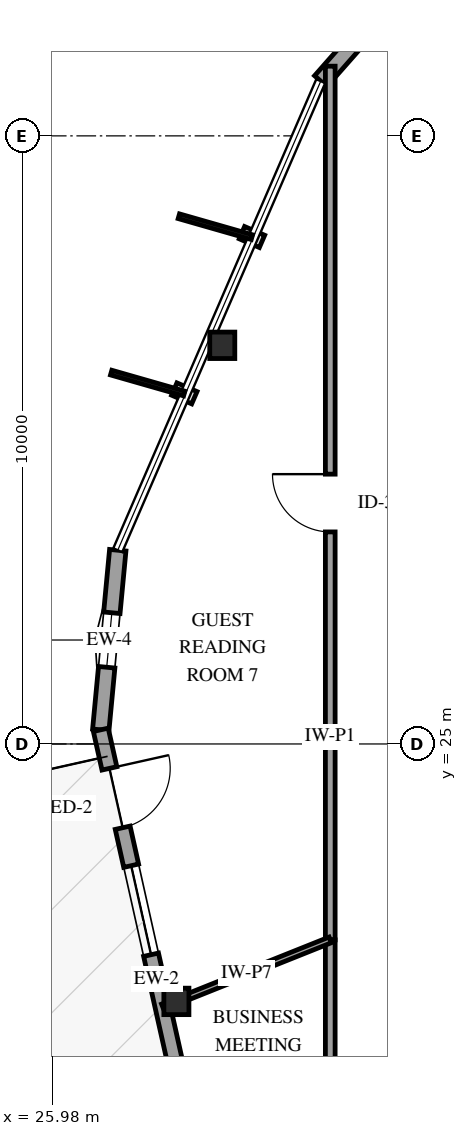
"""IFC4 building model, lengths in metres.
Left out: names, types, materials, properties, quantities, classifications, styles, units other than length and angle.
Written with IfcOpenShell. Run it as: python <this file> out.ifc"""

import sys

from ifc_helpers import new_model, si_unit, direction, frame, frame_2d, origin, origin_2d, place, context, subcontext, project, spatial, rectangle, i_section, extrude, element, fill, save


model = new_model("IFC4")
c1 = context("Model", 3, precision=1e-05, world=origin(), true_north=direction((0.0, 1.0)))
c2 = subcontext(c1, "Body", "Model", "MODEL_VIEW")
j1 = project(units=[si_unit("LENGTHUNIT", "METRE"), si_unit("PLANEANGLEUNIT", "RADIAN")], contexts=[c1])
p1 = place(None, origin())
s1 = spatial("IfcSite", under=j1, at=p1, CompositionType="ELEMENT")
p2 = place(p1, origin())
s2 = spatial("IfcBuilding", under=s1, at=p2, CompositionType="ELEMENT")
p3 = place(p2, frame((0.0, 0.0, 146.2)))
s3 = spatial("IfcBuildingStorey", under=s2, at=p3, CompositionType="ELEMENT", Elevation=146.2)
for number, where, z_axis, x_axis in (
    (1, (28.774, 31.556, 0.0), (0.0, 0.0, 1.0), (1.0, 0.0, 0.0)),
    (2, (28.02, 20.766, 0.0), (0.0, 0.0, 1.0), (1.0, 0.0, 0.0)),
):
    element("IfcColumn", number, at=place(p3, frame(where, z_axis=z_axis, x_axis=x_axis)), inside=s3, PredefinedType="COLUMN", context=c2, shape_type="SweptSolid", body=[
        extrude(i_section(OverallWidth=0.412, OverallDepth=0.435, WebThickness=0.036, FlangeThickness=0.057, FilletRadius=0.038, at=origin_2d()), origin(), (0.0, 0.0, 1.0), 3.6),
    ])
p4 = place(p3, frame((32.355, 38.125, 0.0), z_axis=(0.0, 0.0, 1.0), x_axis=(-0.661354843955, -0.750073176681, 0.0)))
e3 = element("IfcWall", 3, at=p4, inside=s3, PredefinedType="SOLIDWALL", context=c2, shape_type="SweptSolid", body=[
    extrude(rectangle(XDim=2.967, YDim=0.27, at=frame_2d((1.483, 0.0))), origin(), (0.0, 0.0, 1.0), 2.679),
])
p5 = place(p3, frame((27.056, 28.186, 0.0), z_axis=(0.0, 0.0, 1.0), x_axis=(-0.094148838896, -0.995558132976, 0.0)))
e4 = element("IfcWall", 4, at=p5, inside=s3, PredefinedType="SOLIDWALL", context=c2, shape_type="SweptSolid", body=[
    extrude(rectangle(XDim=2.967, YDim=0.27, at=frame_2d((1.483, 0.0))), origin(), (0.0, 0.0, 1.0), 2.679),
])
p6 = place(p5, frame((1.033, 0.0, 0.75)))
e5 = element("IfcOpeningElement", 5, at=p6, cuts=e4, PredefinedType="OPENING", context=c2, shape_type="SweptSolid", body=[
    extrude(rectangle(XDim=0.9, YDim=1.5, at=frame_2d((0.45, 0.75))), frame((0.0, 0.145, 0.0), z_axis=(0.0, -1.0, 0.0), x_axis=(1.0, 0.0, 0.0)), (0.0, 0.0, 1.0), 0.29),
])
p7 = place(p3, frame((26.776, 25.233, 0.0), z_axis=(0.0, 0.0, 1.0), x_axis=(0.218148242033, -0.975915644151, 0.0)))
e6 = element("IfcWall", 6, at=p7, inside=s3, PredefinedType="SOLIDWALL", context=c2, shape_type="SweptSolid", body=[
    extrude(rectangle(XDim=8.405, YDim=0.25, at=frame_2d((4.202, 0.0))), origin(), (0.0, 0.0, 1.0), 2.679),
])
p8 = place(p7, frame((0.65, 0.0, 0.0)))
e7 = element("IfcOpeningElement", 7, at=p8, cuts=e6, PredefinedType="OPENING", context=c2, shape_type="SweptSolid", body=[
    extrude(rectangle(XDim=1.0, YDim=2.15, at=frame_2d((0.5, 1.075))), frame((0.0, 0.135, 0.0), z_axis=(0.0, -1.0, 0.0), x_axis=(1.0, 0.0, 0.0)), (0.0, 0.0, 1.0), 0.27),
])
p9 = place(p7, frame((2.29, 0.0, 0.72)))
e8 = element("IfcOpeningElement", 8, at=p9, cuts=e6, PredefinedType="OPENING", context=c2, shape_type="SweptSolid", body=[
    extrude(rectangle(XDim=1.5, YDim=1.7, at=frame_2d((0.75, 0.85))), frame((0.0, 0.135, 0.0), z_axis=(0.0, -1.0, 0.0), x_axis=(1.0, 0.0, 0.0)), (0.0, 0.0, 1.0), 0.27),
])
p10 = place(p3, frame((30.55, 21.778, 0.0), z_axis=(0.0, 0.0, 1.0), x_axis=(0.0, 1.0, 0.0)))
e9 = element("IfcWall", 9, at=p10, inside=s3, PredefinedType="PARTITIONING", context=c2, shape_type="SweptSolid", body=[
    extrude(rectangle(XDim=14.368, YDim=0.16, at=frame_2d((7.184, 0.0))), origin(), (0.0, 0.0, 1.0), 3.3),
])
p11 = place(p10, frame((6.709, 0.0, 0.0)))
e10 = element("IfcOpeningElement", 10, at=p11, cuts=e9, PredefinedType="OPENING", context=c2, shape_type="SweptSolid", body=[
    extrude(rectangle(XDim=0.95, YDim=2.15, at=frame_2d((0.475, 1.075))), frame((0.0, 0.09, 0.0), z_axis=(0.0, -1.0, 0.0), x_axis=(1.0, 0.0, 0.0)), (0.0, 0.0, 1.0), 0.18),
])
p12 = place(p3, frame((30.55, 14.098, 0.0), z_axis=(0.0, 0.0, 1.0), x_axis=(0.0, 1.0, 0.0)))
e11 = element("IfcWall", 11, at=p12, inside=s3, PredefinedType="PARTITIONING", context=c2, shape_type="SweptSolid", body=[
    extrude(rectangle(XDim=7.68, YDim=0.16, at=frame_2d((3.84, 0.0))), origin(), (0.0, 0.0, 1.0), 3.3),
])
p13 = place(p12, frame((3.365, 0.0, 0.0)))
e12 = element("IfcOpeningElement", 12, at=p13, cuts=e11, PredefinedType="OPENING", context=c2, shape_type="SweptSolid", body=[
    extrude(rectangle(XDim=0.95, YDim=2.15, at=frame_2d((0.475, 1.075))), frame((0.0, 0.09, 0.0), z_axis=(0.0, -1.0, 0.0), x_axis=(1.0, 0.0, 0.0)), (0.0, 0.0, 1.0), 0.18),
])
p14 = place(p3, frame((30.55, 21.778, 0.0), z_axis=(0.0, 0.0, 1.0), x_axis=(-0.928476690885, -0.371390676354, 0.0)))
e13 = element("IfcWall", 13, at=p14, inside=s3, PredefinedType="PARTITIONING", context=c2, shape_type="SweptSolid", body=[
    extrude(rectangle(XDim=2.967, YDim=0.1, at=frame_2d((1.484, 0.0))), origin(), (0.0, 0.0, 1.0), 3.3),
])
p15 = place(p6, origin())
e14 = element("IfcWindow", 14, at=p15, inside=s3, PartitioningType="SINGLE_PANEL", PredefinedType="WINDOW", context=c2, shape_type="SweptSolid", body=[
    extrude(rectangle(XDim=0.9, YDim=1.5, at=frame_2d((0.45, 0.75))), frame((0.0, 0.03, 0.0), z_axis=(0.0, -1.0, 0.0), x_axis=(1.0, 0.0, 0.0)), (0.0, 0.0, 1.0), 0.06),
])
fill(e5, e14)
p16 = place(p8, origin())
e15 = element("IfcDoor", 15, at=p16, inside=s3, OperationType="SINGLE_SWING_LEFT", PredefinedType="DOOR", context=c2, shape_type="SweptSolid", body=[
    extrude(rectangle(XDim=1.0, YDim=2.15, at=frame_2d((0.5, 1.075))), frame((0.0, 0.025, 0.0), z_axis=(0.0, -1.0, 0.0), x_axis=(1.0, 0.0, 0.0)), (0.0, 0.0, 1.0), 0.05),
])
fill(e7, e15)
p17 = place(p9, origin())
e16 = element("IfcWindow", 16, at=p17, inside=s3, PartitioningType="SINGLE_PANEL", PredefinedType="WINDOW", context=c2, shape_type="SweptSolid", body=[
    extrude(rectangle(XDim=1.5, YDim=1.7, at=frame_2d((0.75, 0.85))), frame((0.0, 0.03, 0.0), z_axis=(0.0, -1.0, 0.0), x_axis=(1.0, 0.0, 0.0)), (0.0, 0.0, 1.0), 0.06),
])
fill(e8, e16)
p18 = place(p11, origin())
e17 = element("IfcDoor", 17, at=p18, inside=s3, OperationType="SINGLE_SWING_RIGHT", PredefinedType="DOOR", context=c2, shape_type="SweptSolid", body=[
    extrude(rectangle(XDim=0.95, YDim=2.15, at=frame_2d((0.475, 1.075))), frame((0.0, 0.025, 0.0), z_axis=(0.0, -1.0, 0.0), x_axis=(1.0, 0.0, 0.0)), (0.0, 0.0, 1.0), 0.05),
])
fill(e10, e17)
save(model, sys.argv[1])
